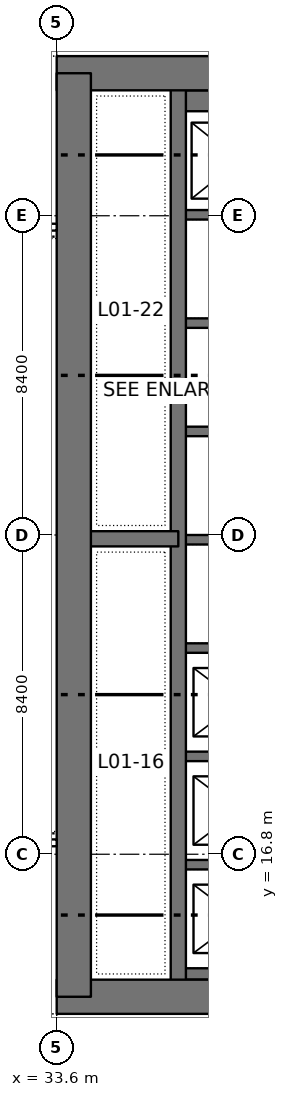
"""IFC4 building model, lengths in metres.
Left out: names, types, materials, properties, quantities, classifications, styles, units other than length and angle.
Written with IfcOpenShell. Run it as: python <this file> out.ifc"""

import sys

from ifc_helpers import new_model, si_unit, direction, frame, frame_2d, origin, place, context, subcontext, project, spatial, rectangle, extrude, element, save


model = new_model("IFC4")
c1 = context("Model", 3, precision=1e-05, world=origin(), true_north=direction((0.0, 1.0)))
c2 = subcontext(c1, "Body", "Model", "MODEL_VIEW")
j1 = project(units=[si_unit("LENGTHUNIT", "METRE"), si_unit("PLANEANGLEUNIT", "RADIAN")], contexts=[c1])
p1 = place(None, origin())
s1 = spatial("IfcSite", under=j1, at=p1, CompositionType="ELEMENT")
p2 = place(p1, origin())
s2 = spatial("IfcBuilding", under=s1, at=p2, CompositionType="ELEMENT")
p3 = place(p2, frame((0.0, 0.0, 5.4)))
s3 = spatial("IfcBuildingStorey", under=s2, at=p3, CompositionType="ELEMENT", Elevation=5.4)
p4 = place(p3, frame((33.6, 13.05, 0.0), z_axis=(0.0, 0.0, 1.0), x_axis=(1.0, 0.0, 0.0)))
e1 = element("IfcWall", 1, at=p4, inside=s3, PredefinedType="SHEAR", context=c2, shape_type="SweptSolid", body=[
    extrude(rectangle(XDim=18.0, YDim=0.9, at=frame_2d((9.0, 0.0))), origin(), (0.0, 0.0, 1.0), 4.5),
])
p5 = place(p4, frame((7.25, 0.0, 0.0)))
e2 = element("IfcOpeningElement", 2, at=p5, cuts=e1, PredefinedType="OPENING", context=c2, shape_type="SweptSolid", body=[
    extrude(rectangle(XDim=1.8, YDim=2.4, at=frame_2d((0.9, 1.2))), frame((0.0, 0.46, 0.0), z_axis=(0.0, -1.0, 0.0), x_axis=(1.0, 0.0, 0.0)), (0.0, 0.0, 1.0), 0.92),
])
p6 = place(p3, frame((33.6, 37.35, 0.0), z_axis=(0.0, 0.0, 1.0), x_axis=(1.0, 0.0, 0.0)))
e3 = element("IfcWall", 3, at=p6, inside=s3, PredefinedType="SHEAR", context=c2, shape_type="SweptSolid", body=[
    extrude(rectangle(XDim=18.0, YDim=0.9, at=frame_2d((9.0, 0.0))), origin(), (0.0, 0.0, 1.0), 4.5),
])
p7 = place(p6, frame((7.25, 0.0, 0.0)))
e4 = element("IfcOpeningElement", 4, at=p7, cuts=e3, PredefinedType="OPENING", context=c2, shape_type="SweptSolid", body=[
    extrude(rectangle(XDim=1.8, YDim=2.4, at=frame_2d((0.9, 1.2))), frame((0.0, 0.46, 0.0), z_axis=(0.0, -1.0, 0.0), x_axis=(1.0, 0.0, 0.0)), (0.0, 0.0, 1.0), 0.92),
])
p8 = place(p3, frame((34.05, 13.05, 0.0), z_axis=(0.0, 0.0, 1.0), x_axis=(0.0, 1.0, 0.0)))
e5 = element("IfcWall", 5, at=p8, inside=s3, PredefinedType="SHEAR", context=c2, shape_type="SweptSolid", body=[
    extrude(rectangle(XDim=24.3, YDim=0.9, at=frame_2d((12.15, 0.0))), origin(), (0.0, 0.0, 1.0), 4.5),
])
p9 = place(p3, frame((36.8, 13.05, 0.0), z_axis=(0.0, 0.0, 1.0), x_axis=(0.0, 1.0, 0.0)))
e6 = element("IfcWall", 6, at=p9, inside=s3, PredefinedType="SHEAR", context=c2, shape_type="SweptSolid", body=[
    extrude(rectangle(XDim=24.3, YDim=0.4, at=frame_2d((12.15, 0.0))), origin(), (0.0, 0.0, 1.0), 4.5),
])
p10 = place(p3, frame((36.8, 25.1, 0.0), z_axis=(0.0, 0.0, 1.0), x_axis=(-1.0, 0.0, 0.0)))
e7 = element("IfcWall", 7, at=p10, inside=s3, PredefinedType="SHEAR", context=c2, shape_type="SweptSolid", body=[
    extrude(rectangle(XDim=2.75, YDim=0.4, at=frame_2d((1.375, 0.0))), origin(), (0.0, 0.0, 1.0), 4.5),
])
p11 = place(p3, frame((40.0, 13.65, 0.0), z_axis=(0.0, 0.0, 1.0), x_axis=(-1.0, 0.0, 0.0)))
e8 = element("IfcWall", 8, at=p11, inside=s3, PredefinedType="SHEAR", context=c2, shape_type="SweptSolid", body=[
    extrude(rectangle(XDim=3.2, YDim=0.3, at=frame_2d((1.6, 0.0))), origin(), (0.0, 0.0, 1.0), 4.5),
])
for number, where, z_axis, x_axis in (
    (9, (40.0, 16.525, 0.0), (0.0, 0.0, 1.0), (-1.0, 0.0, 0.0)),
    (10, (40.0, 19.375, 0.0), (0.0, 0.0, 1.0), (-1.0, 0.0, 0.0)),
    (11, (40.0, 22.225, 0.0), (0.0, 0.0, 1.0), (-1.0, 0.0, 0.0)),
    (12, (40.0, 25.075, 0.0), (0.0, 0.0, 1.0), (-1.0, 0.0, 0.0)),
    (13, (40.0, 27.925, 0.0), (0.0, 0.0, 1.0), (-1.0, 0.0, 0.0)),
    (14, (40.0, 30.775, 0.0), (0.0, 0.0, 1.0), (-1.0, 0.0, 0.0)),
    (15, (40.0, 33.625, 0.0), (0.0, 0.0, 1.0), (-1.0, 0.0, 0.0)),
):
    element("IfcWall", number, at=place(p3, frame(where, z_axis=z_axis, x_axis=x_axis)), inside=s3, PredefinedType="SHEAR", context=c2, shape_type="SweptSolid", body=[
        extrude(rectangle(XDim=3.2, YDim=0.25, at=frame_2d((1.6, 0.0))), origin(), (0.0, 0.0, 1.0), 4.5),
    ])
p12 = place(p3, frame((40.0, 36.625, 0.0), z_axis=(0.0, 0.0, 1.0), x_axis=(-1.0, 0.0, 0.0)))
e16 = element("IfcWall", 16, at=p12, inside=s3, PredefinedType="SHEAR", context=c2, shape_type="SweptSolid", body=[
    extrude(rectangle(XDim=3.2, YDim=0.55, at=frame_2d((1.6, 0.0))), origin(), (0.0, 0.0, 1.0), 4.5),
])
save(model, sys.argv[1])
